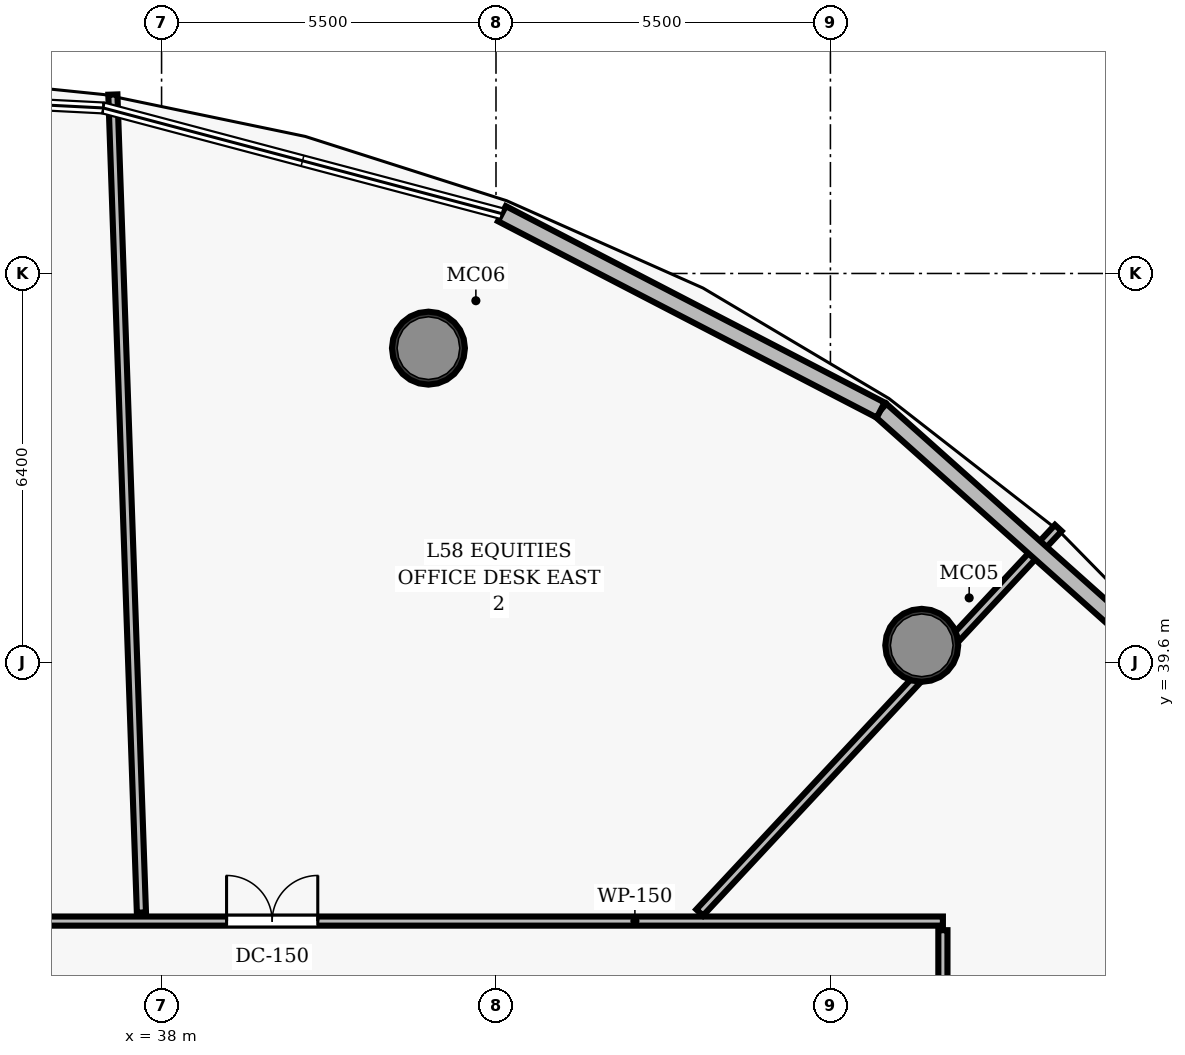
"""IFC4 building model, lengths in metres.
Left out: names, types, materials, properties, quantities, classifications, styles, units other than length and angle.
Written with IfcOpenShell. Run it as: python <this file> out.ifc"""

import sys

from ifc_helpers import new_model, si_unit, direction, frame, frame_2d, origin, origin_2d, place, context, subcontext, project, spatial, rectangle, hollow_circle, extrude, element, fill, save


model = new_model("IFC4")
c1 = context("Model", 3, precision=1e-05, world=origin(), true_north=direction((0.0, 1.0)))
c2 = subcontext(c1, "Body", "Model", "MODEL_VIEW")
j1 = project(units=[si_unit("LENGTHUNIT", "METRE"), si_unit("PLANEANGLEUNIT", "RADIAN")], contexts=[c1])
p1 = place(None, origin())
s1 = spatial("IfcSite", under=j1, at=p1, CompositionType="ELEMENT")
p2 = place(p1, origin())
s2 = spatial("IfcBuilding", under=s1, at=p2, CompositionType="ELEMENT")
p3 = place(p2, frame((0.0, 0.0, 228.95)))
s3 = spatial("IfcBuildingStorey", under=s2, at=p3, CompositionType="ELEMENT", Elevation=228.95)
for number, where, z_axis, x_axis in (
    (1, (50.502, 39.885, 0.0), (0.0, 0.0, 1.0), (1.0, 0.0, 0.0)),
    (2, (42.389, 44.772, 0.0), (0.0, 0.0, 1.0), (1.0, 0.0, 0.0)),
):
    element("IfcColumn", number, at=place(p3, frame(where, z_axis=z_axis, x_axis=x_axis)), inside=s3, PredefinedType="COLUMN", context=c2, shape_type="SweptSolid", body=[
        extrude(hollow_circle(Radius=0.6, WallThickness=0.05, at=origin_2d()), origin(), (0.0, 0.0, 1.0), 3.85),
    ])
p4 = place(p3, frame((24.85, 35.35, 0.0), z_axis=(0.0, 0.0, 1.0), x_axis=(1.0, 0.0, 0.0)))
e3 = element("IfcWall", 3, at=p4, inside=s3, PredefinedType="PARTITIONING", context=c2, shape_type="SweptSolid", body=[
    extrude(rectangle(XDim=26.0, YDim=0.15, at=frame_2d((13.0, 0.0))), origin(), (0.0, 0.0, 1.0), 3.035),
])
p5 = place(p4, frame((14.219, 0.0, 0.0)))
e4 = element("IfcOpeningElement", 4, at=p5, cuts=e3, PredefinedType="OPENING", context=c2, shape_type="SweptSolid", body=[
    extrude(rectangle(XDim=1.5, YDim=2.2, at=frame_2d((0.75, 1.1))), frame((0.0, 0.085, 0.0), z_axis=(0.0, -1.0, 0.0), x_axis=(1.0, 0.0, 0.0)), (0.0, 0.0, 1.0), 0.17),
])
p6 = place(p4, frame((5.566, 0.0, 0.0)))
e5 = element("IfcOpeningElement", 5, at=p6, cuts=e3, PredefinedType="OPENING", context=c2, shape_type="SweptSolid", body=[
    extrude(rectangle(XDim=1.5, YDim=2.2, at=frame_2d((0.75, 1.1))), frame((0.0, 0.085, 0.0), z_axis=(0.0, -1.0, 0.0), x_axis=(1.0, 0.0, 0.0)), (0.0, 0.0, 1.0), 0.17),
])
p7 = place(p3, frame((50.85, 27.08, 0.0), z_axis=(0.0, 0.0, 1.0), x_axis=(0.0, 1.0, 0.0)))
e6 = element("IfcWall", 6, at=p7, inside=s3, PredefinedType="PARTITIONING", context=c2, shape_type="SweptSolid", body=[
    extrude(rectangle(XDim=8.12, YDim=0.15, at=frame_2d((4.06, 0.0))), origin(), (0.0, 0.0, 1.0), 3.035),
])
p8 = place(p3, frame((46.85, 35.49, 0.0), z_axis=(0.0, 0.0, 1.0), x_axis=(0.68200031128, 0.731351882075, 0.0)))
e7 = element("IfcWall", 7, at=p8, inside=s3, PredefinedType="PARTITIONING", context=c2, shape_type="SweptSolid", body=[
    extrude(rectangle(XDim=8.647, YDim=0.15, at=frame_2d((4.324, 0.0))), origin(), (0.0, 0.0, 1.0), 3.035),
])
p9 = place(p3, frame((37.669, 35.49, 0.0), z_axis=(0.0, 0.0, 1.0), x_axis=(-0.034915177635, 0.999390279306, 0.0)))
e8 = element("IfcWall", 8, at=p9, inside=s3, PredefinedType="PARTITIONING", context=c2, shape_type="SweptSolid", body=[
    extrude(rectangle(XDim=13.46, YDim=0.15, at=frame_2d((6.73, 0.0))), origin(), (0.0, 0.0, 1.0), 3.035),
])
p10 = place(p3, frame((49.827, 43.753, 0.0), z_axis=(0.0, 0.0, 1.0), x_axis=(0.746012050709, -0.665932444169, 0.0)))
e9 = element("IfcWall", 9, at=p10, inside=s3, PredefinedType="SOLIDWALL", context=c2, shape_type="SweptSolid", body=[
    extrude(rectangle(XDim=7.046, YDim=0.28, at=frame_2d((3.523, 0.0))), origin(), (0.0, 0.0, 1.0), 3.62),
])
p11 = place(p3, frame((43.597, 46.984, 0.0), z_axis=(0.0, 0.0, 1.0), x_axis=(0.887740840653, -0.460343567172, 0.0)))
e10 = element("IfcWall", 10, at=p11, inside=s3, PredefinedType="SOLIDWALL", context=c2, shape_type="SweptSolid", body=[
    extrude(rectangle(XDim=7.018, YDim=0.28, at=frame_2d((3.509, 0.0))), origin(), (0.0, 0.0, 1.0), 3.62),
])
p12 = place(p5, origin())
e11 = element("IfcDoor", 11, at=p12, inside=s3, OperationType="DOUBLE_DOOR_SINGLE_SWING", PredefinedType="DOOR", context=c2, shape_type="SweptSolid", body=[
    extrude(rectangle(XDim=1.5, YDim=2.2, at=frame_2d((0.75, 1.1))), frame((0.0, 0.025, 0.0), z_axis=(0.0, -1.0, 0.0), x_axis=(1.0, 0.0, 0.0)), (0.0, 0.0, 1.0), 0.05),
])
fill(e4, e11)
save(model, sys.argv[1])
